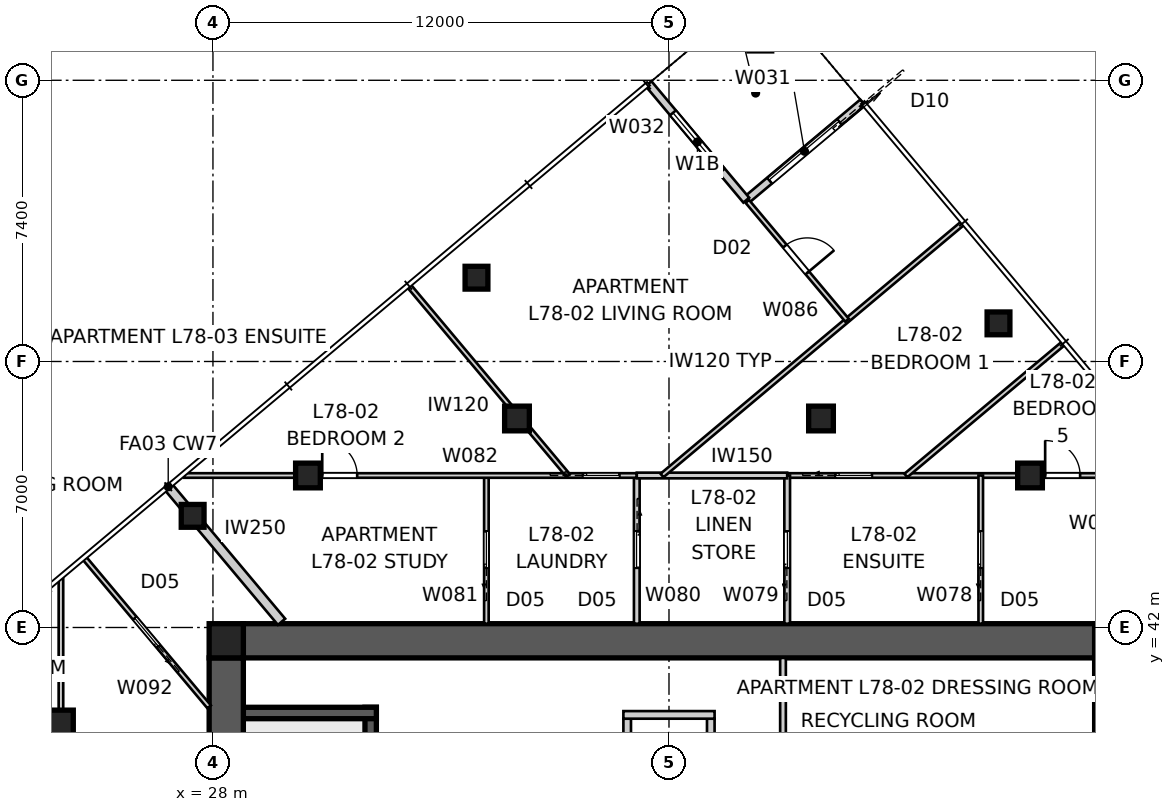
"""IFC4 building model, lengths in metres.
Left out: names, types, materials, properties, quantities, classifications, styles, units other than length and angle.
Written with IfcOpenShell. Run it as: python <this file> out.ifc"""

import sys

from ifc_helpers import new_model, si_unit, direction, frame, frame_2d, origin, origin_2d, place, context, subcontext, project, spatial, polyline, rectangle, outline, extrude, element, fill, save


model = new_model("IFC4")
c1 = context("Model", 3, precision=1e-05, world=origin(), true_north=direction((0.0, 1.0)))
c2 = subcontext(c1, "Body", "Model", "MODEL_VIEW")
j1 = project(units=[si_unit("LENGTHUNIT", "METRE"), si_unit("PLANEANGLEUNIT", "RADIAN")], contexts=[c1])
p1 = place(None, origin())
s1 = spatial("IfcSite", under=j1, at=p1, CompositionType="ELEMENT")
p2 = place(p1, origin())
s2 = spatial("IfcBuilding", under=s1, at=p2, CompositionType="ELEMENT")
p3 = place(p2, frame((0.0, 0.0, 282.8)))
s3 = spatial("IfcBuildingStorey", under=s2, at=p3, CompositionType="ELEMENT", Elevation=282.8)
p4 = place(p3, frame((28.8, 41.65, 0.0), z_axis=(0.0, 0.0, 1.0), x_axis=(1.0, 0.0, 0.0)))
e1 = element("IfcWall", 1, at=p4, inside=s3, PredefinedType="SHEAR", context=c2, shape_type="SweptSolid", body=[
    extrude(outline(polyline([(0.0, -0.45), (22.4, -0.45), (22.4, -0.025), (22.85, -0.025), (22.85, 0.025), (22.4, 0.025), (22.4, 0.45), (0.0, 0.45), (0.0, 0.025), (-0.45, 0.025), (-0.45, -0.025), (0.0, -0.025), (0.0, -0.45)])), origin(), (0.0, 0.0, 1.0), 3.4),
])
p5 = place(p3, frame((51.65, 18.8, 0.0), z_axis=(0.0, 0.0, 1.0), x_axis=(0.0, 1.0, 0.0)))
e2 = element("IfcWall", 2, at=p5, inside=s3, PredefinedType="SHEAR", context=c2, shape_type="SweptSolid", body=[
    extrude(outline(polyline([(0.0, -0.45), (22.4, -0.45), (22.4, -0.025), (22.85, -0.025), (22.85, 0.025), (22.4, 0.025), (22.4, 0.45), (0.0, 0.45), (0.0, 0.025), (-0.45, 0.025), (-0.45, -0.025), (0.0, -0.025), (0.0, -0.45)])), origin(), (0.0, 0.0, 1.0), 3.4),
])
p6 = place(p5, frame((11.14, 0.0, 0.0)))
e3 = element("IfcOpeningElement", 3, at=p6, cuts=e2, PredefinedType="OPENING", context=c2, shape_type="SweptSolid", body=[
    extrude(rectangle(XDim=1.02, YDim=2.4, at=frame_2d((0.51, 1.2))), frame((0.0, 0.46, 0.0), z_axis=(0.0, -1.0, 0.0), x_axis=(1.0, 0.0, 0.0)), (0.0, 0.0, 1.0), 0.92),
])
p7 = place(p3, frame((28.35, 41.2, 0.0), z_axis=(0.0, 0.0, 1.0), x_axis=(0.0, -1.0, 0.0)))
e4 = element("IfcWall", 4, at=p7, inside=s3, PredefinedType="SHEAR", context=c2, shape_type="SweptSolid", body=[
    extrude(outline(polyline([(0.0, -0.45), (22.4, -0.45), (22.4, -0.025), (22.85, -0.025), (22.85, 0.025), (22.4, 0.025), (22.4, 0.45), (0.0, 0.45), (0.0, 0.025), (-0.45, 0.025), (-0.45, -0.025), (0.0, -0.025), (0.0, -0.45)])), origin(), (0.0, 0.0, 1.0), 3.4),
])
p8 = place(p7, frame((11.14, 0.0, 0.0)))
e5 = element("IfcOpeningElement", 5, at=p8, cuts=e4, PredefinedType="OPENING", context=c2, shape_type="SweptSolid", body=[
    extrude(rectangle(XDim=1.02, YDim=2.4, at=frame_2d((0.51, 1.2))), frame((0.0, 0.46, 0.0), z_axis=(0.0, -1.0, 0.0), x_axis=(1.0, 0.0, 0.0)), (0.0, 0.0, 1.0), 0.92),
])
p9 = place(p3, frame((32.15, 32.2, 0.0), z_axis=(0.0, 0.0, 1.0), x_axis=(0.0, 1.0, 0.0)))
e6 = element("IfcWall", 6, at=p9, inside=s3, PredefinedType="SHEAR", context=c2, shape_type="SweptSolid", body=[
    extrude(rectangle(XDim=7.7, YDim=0.3, at=frame_2d((3.85, 0.0))), origin(), (0.0, 0.0, 1.0), 3.4),
])
p10 = place(p3, frame((28.8, 39.75, 0.0), z_axis=(0.0, 0.0, 1.0), x_axis=(1.0, 0.0, 0.0)))
e7 = element("IfcWall", 7, at=p10, inside=s3, PredefinedType="SHEAR", context=c2, shape_type="SweptSolid", body=[
    extrude(rectangle(XDim=3.5, YDim=0.3, at=frame_2d((1.75, 0.0))), origin(), (0.0, 0.0, 1.0), 3.4),
])
for number, where, z_axis, x_axis in (
    (8, (38.9, 37.6, 0.0), (0.0, 0.0, 1.0), (0.0, 1.0, 0.0)),
    (9, (41.1, 37.6, 0.0), (0.0, 0.0, 1.0), (0.0, 1.0, 0.0)),
):
    element("IfcWall", number, at=place(p3, frame(where, z_axis=z_axis, x_axis=x_axis)), inside=s3, PredefinedType="SOLIDWALL", context=c2, shape_type="SweptSolid", body=[
        extrude(rectangle(XDim=2.0, YDim=0.2, at=frame_2d((1.0, 0.0))), origin(), (0.0, 0.0, 1.0), 3.4),
    ])
p11 = place(p3, frame((38.8, 39.7, 0.0), z_axis=(0.0, 0.0, 1.0), x_axis=(1.0, 0.0, 0.0)))
e10 = element("IfcWall", 10, at=p11, inside=s3, PredefinedType="SOLIDWALL", context=c2, shape_type="SweptSolid", body=[
    extrude(rectangle(XDim=2.4, YDim=0.2, at=frame_2d((1.2, 0.0))), origin(), (0.0, 0.0, 1.0), 3.4),
])
for number, where, z_axis, x_axis in (
    (11, (51.65, 41.65, 0.0), (0.0, 0.0, 1.0), (1.0, 0.0, 0.0)),
    (12, (28.35, 41.65, 0.0), (0.0, 0.0, 1.0), (1.0, 0.0, 0.0)),
):
    element("IfcColumn", number, at=place(p3, frame(where, z_axis=z_axis, x_axis=x_axis)), inside=s3, PredefinedType="COLUMN", context=c2, shape_type="SweptSolid", body=[
        extrude(rectangle(XDim=0.9, YDim=0.9, at=origin_2d()), origin(), (0.0, 0.0, 1.0), 3.4),
    ])
for number, where, z_axis, x_axis in (
    (13, (48.671, 50.003, 0.0), (0.0, 0.0, 1.0), (1.0, 0.0, 0.0)),
    (14, (34.935, 51.205, 0.0), (0.0, 0.0, 1.0), (1.0, 0.0, 0.0)),
    (15, (27.466, 44.938, 0.0), (0.0, 0.0, 1.0), (1.0, 0.0, 0.0)),
):
    element("IfcColumn", number, at=place(p3, frame(where, z_axis=z_axis, x_axis=x_axis)), inside=s3, PredefinedType="COLUMN", context=c2, shape_type="SweptSolid", body=[
        extrude(rectangle(XDim=0.6, YDim=0.6, at=origin_2d()), origin(), (0.0, 0.0, 1.0), 3.4),
    ])
for number, where, z_axis, x_axis in (
    (16, (49.5, 46.0, 0.0), (0.0, 0.0, 1.0), (1.0, 0.0, 0.0)),
    (17, (44.0, 47.5, 0.0), (0.0, 0.0, 1.0), (1.0, 0.0, 0.0)),
    (18, (36.0, 47.5, 0.0), (0.0, 0.0, 1.0), (1.0, 0.0, 0.0)),
    (19, (30.5, 46.0, 0.0), (0.0, 0.0, 1.0), (1.0, 0.0, 0.0)),
    (20, (24.0, 39.5, 0.0), (0.0, 0.0, 1.0), (1.0, 0.0, 0.0)),
):
    element("IfcColumn", number, at=place(p3, frame(where, z_axis=z_axis, x_axis=x_axis)), inside=s3, PredefinedType="COLUMN", context=c2, shape_type="SweptSolid", body=[
        extrude(rectangle(XDim=0.65, YDim=0.65, at=origin_2d()), origin(), (0.0, 0.0, 1.0), 3.4),
    ])
p12 = place(p3, frame((45.098, 55.817, 0.0), z_axis=(0.0, 0.0, 1.0), x_axis=(-0.766060656284, -0.642768287094, 0.0)))
e21 = element("IfcWall", 21, at=p12, inside=s3, PredefinedType="SOLIDWALL", context=c2, shape_type="SweptSolid", body=[
    extrude(rectangle(XDim=4.0, YDim=0.2, at=frame_2d((2.0, 0.0))), origin(), (0.0, 0.0, 1.0), 3.25),
])
p13 = place(p12, frame((0.8, 0.0, 0.0)))
e22 = element("IfcOpeningElement", 22, at=p13, cuts=e21, PredefinedType="OPENING", context=c2, shape_type="SweptSolid", body=[
    extrude(rectangle(XDim=2.4, YDim=2.4, at=frame_2d((1.2, 1.2))), frame((0.0, 0.11, 0.0), z_axis=(0.0, -1.0, 0.0), x_axis=(1.0, 0.0, 0.0)), (0.0, 0.0, 1.0), 0.22),
])
p14 = place(p3, frame((42.034, 53.246, 0.0), z_axis=(0.0, 0.0, 1.0), x_axis=(-0.642798342015, 0.766035437498, 0.0)))
e23 = element("IfcWall", 23, at=p14, inside=s3, PredefinedType="SOLIDWALL", context=c2, shape_type="SweptSolid", body=[
    extrude(rectangle(XDim=4.0, YDim=0.2, at=frame_2d((2.0, 0.0))), origin(), (0.0, 0.0, 1.0), 3.25),
])
p15 = place(p14, frame((1.0, 0.0, 0.45)))
e24 = element("IfcOpeningElement", 24, at=p15, cuts=e23, PredefinedType="OPENING", context=c2, shape_type="SweptSolid", body=[
    extrude(rectangle(XDim=2.0, YDim=1.8, at=frame_2d((1.0, 0.9))), frame((0.0, 0.11, 0.0), z_axis=(0.0, -1.0, 0.0), x_axis=(1.0, 0.0, 0.0)), (0.0, 0.0, 1.0), 0.22),
])
p16 = place(p3, frame((26.823, 45.704, 0.0), z_axis=(0.0, 0.0, 1.0), x_axis=(0.64279957712, -0.76603440109, 0.0)))
e25 = element("IfcWall", 25, at=p16, inside=s3, PredefinedType="PARTITIONING", context=c2, shape_type="SweptSolid", body=[
    extrude(rectangle(XDim=4.64, YDim=0.25, at=frame_2d((2.32, 0.0))), origin(), (0.0, 0.0, 1.0), 3.25),
])
p17 = place(p3, frame((43.0, 41.2, 0.0), z_axis=(0.0, 0.0, 1.0), x_axis=(0.0, -1.0, 0.0)))
e26 = element("IfcWall", 26, at=p17, inside=s3, PredefinedType="SOLIDWALL", context=c2, shape_type="SweptSolid", body=[
    extrude(rectangle(XDim=5.9, YDim=0.15, at=frame_2d((2.95, 0.0))), origin(), (0.0, 0.0, 1.0), 3.25),
])
p18 = place(p3, frame((43.11, 46.0, 0.0), z_axis=(0.0, 0.0, 1.0), x_axis=(1.0, 0.0, 0.0)))
e27 = element("IfcWall", 27, at=p18, inside=s3, PredefinedType="PARTITIONING", context=c2, shape_type="SweptSolid", body=[
    extrude(rectangle(XDim=10.173, YDim=0.12, at=frame_2d((5.086, 0.0))), origin(), (0.0, 0.0, 1.0), 2.549),
])
p19 = place(p18, frame((6.788, 0.0, 0.0)))
e28 = element("IfcOpeningElement", 28, at=p19, cuts=e27, PredefinedType="OPENING", context=c2, shape_type="SweptSolid", body=[
    extrude(rectangle(XDim=0.92, YDim=2.34, at=frame_2d((0.46, 1.17))), frame((0.0, 0.07, 0.0), z_axis=(0.0, -1.0, 0.0), x_axis=(1.0, 0.0, 0.0)), (0.0, 0.0, 1.0), 0.14),
])
p20 = place(p18, frame((1.271, 0.0, 0.0)))
e29 = element("IfcOpeningElement", 29, at=p20, cuts=e27, PredefinedType="OPENING", context=c2, shape_type="SweptSolid", body=[
    extrude(rectangle(XDim=0.96, YDim=2.1, at=frame_2d((0.48, 1.05))), frame((0.0, 0.07, 0.0), z_axis=(0.0, -1.0, 0.0), x_axis=(1.0, 0.0, 0.0)), (0.0, 0.0, 1.0), 0.14),
])
p21 = place(p3, frame((48.203, 42.1, 0.0), z_axis=(0.0, 0.0, 1.0), x_axis=(0.0, 1.0, 0.0)))
e30 = element("IfcWall", 30, at=p21, inside=s3, PredefinedType="PARTITIONING", context=c2, shape_type="SweptSolid", body=[
    extrude(rectangle(XDim=3.9, YDim=0.12, at=frame_2d((1.95, 0.0))), origin(), (0.0, 0.0, 1.0), 3.25),
])
p22 = place(p21, frame((1.47, 0.0, 0.0)))
e31 = element("IfcOpeningElement", 31, at=p22, cuts=e30, PredefinedType="OPENING", context=c2, shape_type="SweptSolid", body=[
    extrude(rectangle(XDim=0.96, YDim=2.1, at=frame_2d((0.48, 1.05))), frame((0.0, 0.07, 0.0), z_axis=(0.0, -1.0, 0.0), x_axis=(1.0, 0.0, 0.0)), (0.0, 0.0, 1.0), 0.14),
])
p23 = place(p3, frame((43.11, 42.1, 0.0), z_axis=(0.0, 0.0, 1.0), x_axis=(0.0, 1.0, 0.0)))
e32 = element("IfcWall", 32, at=p23, inside=s3, PredefinedType="SOLIDWALL", context=c2, shape_type="SweptSolid", body=[
    extrude(rectangle(XDim=3.9, YDim=0.15, at=frame_2d((1.95, 0.0))), origin(), (0.0, 0.0, 1.0), 3.25),
])
p24 = place(p23, frame((1.47, 0.0, 0.0)))
e33 = element("IfcOpeningElement", 33, at=p24, cuts=e32, PredefinedType="OPENING", context=c2, shape_type="SweptSolid", body=[
    extrude(rectangle(XDim=0.96, YDim=2.1, at=frame_2d((0.48, 1.05))), frame((0.0, 0.085, 0.0), z_axis=(0.0, -1.0, 0.0), x_axis=(1.0, 0.0, 0.0)), (0.0, 0.0, 1.0), 0.17),
])
p25 = place(p3, frame((39.153, 46.0, 0.0), z_axis=(0.0, 0.0, 1.0), x_axis=(0.0, -1.0, 0.0)))
e34 = element("IfcWall", 34, at=p25, inside=s3, PredefinedType="SOLIDWALL", context=c2, shape_type="SweptSolid", body=[
    extrude(rectangle(XDim=3.9, YDim=0.15, at=frame_2d((1.95, 0.0))), origin(), (0.0, 0.0, 1.0), 3.25),
])
p26 = place(p25, frame((1.47, 0.0, 0.0)))
e35 = element("IfcOpeningElement", 35, at=p26, cuts=e34, PredefinedType="OPENING", context=c2, shape_type="SweptSolid", body=[
    extrude(rectangle(XDim=0.96, YDim=2.1, at=frame_2d((0.48, 1.05))), frame((0.0, 0.085, 0.0), z_axis=(0.0, -1.0, 0.0), x_axis=(1.0, 0.0, 0.0)), (0.0, 0.0, 1.0), 0.17),
])
p27 = place(p3, frame((35.195, 42.1, 0.0), z_axis=(0.0, 0.0, 1.0), x_axis=(0.0, 1.0, 0.0)))
e36 = element("IfcWall", 36, at=p27, inside=s3, PredefinedType="PARTITIONING", context=c2, shape_type="SweptSolid", body=[
    extrude(rectangle(XDim=3.9, YDim=0.12, at=frame_2d((1.95, 0.0))), origin(), (0.0, 0.0, 1.0), 3.25),
])
p28 = place(p27, frame((1.47, 0.0, 0.0)))
e37 = element("IfcOpeningElement", 37, at=p28, cuts=e36, PredefinedType="OPENING", context=c2, shape_type="SweptSolid", body=[
    extrude(rectangle(XDim=0.96, YDim=2.1, at=frame_2d((0.48, 1.05))), frame((0.0, 0.07, 0.0), z_axis=(0.0, -1.0, 0.0), x_axis=(1.0, 0.0, 0.0)), (0.0, 0.0, 1.0), 0.14),
])
p29 = place(p3, frame((27.238, 46.0, 0.0), z_axis=(0.0, 0.0, 1.0), x_axis=(1.0, 0.0, 0.0)))
e38 = element("IfcWall", 38, at=p29, inside=s3, PredefinedType="PARTITIONING", context=c2, shape_type="SweptSolid", body=[
    extrude(rectangle(XDim=11.915, YDim=0.12, at=frame_2d((5.957, 0.0))), origin(), (0.0, 0.0, 1.0), 2.549),
])
p30 = place(p29, frame((3.637, 0.0, 0.0)))
e39 = element("IfcOpeningElement", 39, at=p30, cuts=e38, PredefinedType="OPENING", context=c2, shape_type="SweptSolid", body=[
    extrude(rectangle(XDim=0.92, YDim=2.34, at=frame_2d((0.46, 1.17))), frame((0.0, 0.07, 0.0), z_axis=(0.0, -1.0, 0.0), x_axis=(1.0, 0.0, 0.0)), (0.0, 0.0, 1.0), 0.14),
])
p31 = place(p29, frame((10.498, 0.0, 0.0)))
e40 = element("IfcOpeningElement", 40, at=p31, cuts=e38, PredefinedType="OPENING", context=c2, shape_type="SweptSolid", body=[
    extrude(rectangle(XDim=0.96, YDim=2.1, at=frame_2d((0.48, 1.05))), frame((0.0, 0.07, 0.0), z_axis=(0.0, -1.0, 0.0), x_axis=(1.0, 0.0, 0.0)), (0.0, 0.0, 1.0), 0.14),
])
p32 = place(p3, frame((39.153, 46.0, 0.0), z_axis=(0.0, 0.0, 1.0), x_axis=(1.0, 0.0, 0.0)))
e41 = element("IfcWall", 41, at=p32, inside=s3, PredefinedType="SOLIDWALL", context=c2, shape_type="SweptSolid", body=[
    extrude(rectangle(XDim=3.958, YDim=0.15, at=frame_2d((1.979, 0.0))), origin(), (0.0, 0.0, 1.0), 3.25),
])
p33 = place(p3, frame((47.719, 52.631, 0.0), z_axis=(0.0, 0.0, 1.0), x_axis=(-0.766052076481, -0.64277851249, 0.0)))
e42 = element("IfcWall", 42, at=p33, inside=s3, PredefinedType="PARTITIONING", context=c2, shape_type="SweptSolid", body=[
    extrude(rectangle(XDim=10.316, YDim=0.12, at=frame_2d((5.158, 0.0))), origin(), (0.0, 0.0, 1.0), 3.25),
])
p34 = place(p3, frame((37.344, 46.0, 0.0), z_axis=(0.0, 0.0, 1.0), x_axis=(-0.642779498388, 0.766051249233, 0.0)))
e43 = element("IfcWall", 43, at=p34, inside=s3, PredefinedType="PARTITIONING", context=c2, shape_type="SweptSolid", body=[
    extrude(rectangle(XDim=6.496, YDim=0.12, at=frame_2d((3.248, 0.0))), origin(), (0.0, 0.0, 1.0), 3.25),
])
p35 = place(p3, frame((42.06, 53.215, 0.0), z_axis=(0.0, 0.0, 1.0), x_axis=(0.642796729538, -0.766036790562, 0.0)))
e44 = element("IfcWall", 44, at=p35, inside=s3, PredefinedType="PARTITIONING", context=c2, shape_type="SweptSolid", body=[
    extrude(rectangle(XDim=4.085, YDim=0.12, at=frame_2d((2.042, 0.0))), origin(), (0.0, 0.0, 1.0), 3.25),
])
p36 = place(p35, frame((1.538, 0.0, 0.0)))
e45 = element("IfcOpeningElement", 45, at=p36, cuts=e44, PredefinedType="OPENING", context=c2, shape_type="SweptSolid", body=[
    extrude(rectangle(XDim=0.92, YDim=2.34, at=frame_2d((0.46, 1.17))), frame((0.0, 0.07, 0.0), z_axis=(0.0, -1.0, 0.0), x_axis=(1.0, 0.0, 0.0)), (0.0, 0.0, 1.0), 0.14),
])
p37 = place(p3, frame((50.37, 49.471, 0.0), z_axis=(0.0, 0.0, 1.0), x_axis=(-0.766056536168, -0.642773197476, 0.0)))
e46 = element("IfcWall", 46, at=p37, inside=s3, PredefinedType="PARTITIONING", context=c2, shape_type="SweptSolid", body=[
    extrude(rectangle(XDim=5.4, YDim=0.12, at=frame_2d((2.7, 0.0))), origin(), (0.0, 0.0, 1.0), 3.25),
])
p38 = place(p3, frame((24.0, 17.238, 0.0), z_axis=(0.0, 0.0, 1.0), x_axis=(0.0, 1.0, 0.0)))
e47 = element("IfcWall", 47, at=p38, inside=s3, PredefinedType="PARTITIONING", context=c2, shape_type="SweptSolid", body=[
    extrude(rectangle(XDim=26.045, YDim=0.12, at=frame_2d((13.022, 0.0))), origin(), (0.0, 0.0, 1.0), 2.549),
])
p39 = place(p38, frame((13.116, 0.0, 0.0)))
e48 = element("IfcOpeningElement", 48, at=p39, cuts=e47, PredefinedType="OPENING", context=c2, shape_type="SweptSolid", body=[
    extrude(rectangle(XDim=0.92, YDim=2.34, at=frame_2d((0.46, 1.17))), frame((0.0, 0.07, 0.0), z_axis=(0.0, -1.0, 0.0), x_axis=(1.0, 0.0, 0.0)), (0.0, 0.0, 1.0), 0.14),
])
p40 = place(p38, frame((15.705, 0.0, 0.0)))
e49 = element("IfcOpeningElement", 49, at=p40, cuts=e47, PredefinedType="OPENING", context=c2, shape_type="SweptSolid", body=[
    extrude(rectangle(XDim=0.92, YDim=2.34, at=frame_2d((0.46, 1.17))), frame((0.0, 0.07, 0.0), z_axis=(0.0, -1.0, 0.0), x_axis=(1.0, 0.0, 0.0)), (0.0, 0.0, 1.0), 0.14),
])
p41 = place(p38, frame((20.191, 0.0, 0.0)))
e50 = element("IfcOpeningElement", 50, at=p41, cuts=e47, PredefinedType="OPENING", context=c2, shape_type="SweptSolid", body=[
    extrude(rectangle(XDim=0.96, YDim=2.1, at=frame_2d((0.48, 1.05))), frame((0.0, 0.07, 0.0), z_axis=(0.0, -1.0, 0.0), x_axis=(1.0, 0.0, 0.0)), (0.0, 0.0, 1.0), 0.14),
])
p42 = place(p38, frame((3.631, 0.0, 0.0)))
e51 = element("IfcOpeningElement", 51, at=p42, cuts=e47, PredefinedType="OPENING", context=c2, shape_type="SweptSolid", body=[
    extrude(rectangle(XDim=0.92, YDim=2.34, at=frame_2d((0.46, 1.17))), frame((0.0, 0.07, 0.0), z_axis=(0.0, -1.0, 0.0), x_axis=(1.0, 0.0, 0.0)), (0.0, 0.0, 1.0), 0.14),
])
p43 = place(p3, frame((27.9, 39.913, 0.0), z_axis=(0.0, 0.0, 1.0), x_axis=(-0.64279031777, 0.766042170759, 0.0)))
e52 = element("IfcWall", 52, at=p43, inside=s3, PredefinedType="PARTITIONING", context=c2, shape_type="SweptSolid", body=[
    extrude(rectangle(XDim=5.089, YDim=0.12, at=frame_2d((2.544, 0.0))), origin(), (0.0, 0.0, 1.0), 3.25),
])
p44 = place(p43, frame((2.084, 0.0, 0.0)))
e53 = element("IfcOpeningElement", 53, at=p44, cuts=e52, PredefinedType="OPENING", context=c2, shape_type="SweptSolid", body=[
    extrude(rectangle(XDim=0.96, YDim=2.1, at=frame_2d((0.48, 1.05))), frame((0.0, 0.07, 0.0), z_axis=(0.0, -1.0, 0.0), x_axis=(1.0, 0.0, 0.0)), (0.0, 0.0, 1.0), 0.14),
])
p45 = place(p3, frame((20.529, 40.37, 0.0), z_axis=(0.0, 0.0, 1.0), x_axis=(0.642799726543, -0.766034275706, 0.0)))
e54 = element("IfcWall", 54, at=p45, inside=s3, PredefinedType="PARTITIONING", context=c2, shape_type="SweptSolid", body=[
    extrude(rectangle(XDim=5.4, YDim=0.12, at=frame_2d((2.7, 0.0))), origin(), (0.0, 0.0, 1.0), 3.25),
])
p46 = place(p13, origin())
e55 = element("IfcDoor", 55, at=p46, inside=s3, OperationType="SLIDING_TO_LEFT", PredefinedType="DOOR", context=c2, shape_type="SweptSolid", body=[
    extrude(rectangle(XDim=2.4, YDim=2.4, at=frame_2d((1.2, 1.2))), frame((0.0, 0.025, 0.0), z_axis=(0.0, -1.0, 0.0), x_axis=(1.0, 0.0, 0.0)), (0.0, 0.0, 1.0), 0.05),
])
fill(e22, e55)
p47 = place(p15, origin())
e56 = element("IfcWindow", 56, at=p47, inside=s3, PartitioningType="SINGLE_PANEL", PredefinedType="WINDOW", context=c2, shape_type="SweptSolid", body=[
    extrude(rectangle(XDim=2.0, YDim=1.8, at=frame_2d((1.0, 0.9))), frame((0.0, 0.03, 0.0), z_axis=(0.0, -1.0, 0.0), x_axis=(1.0, 0.0, 0.0)), (0.0, 0.0, 1.0), 0.06),
])
fill(e24, e56)
p48 = place(p19, origin())
e57 = element("IfcDoor", 57, at=p48, inside=s3, OperationType="SINGLE_SWING_LEFT", PredefinedType="DOOR", context=c2, shape_type="SweptSolid", body=[
    extrude(rectangle(XDim=0.92, YDim=2.34, at=frame_2d((0.46, 1.17))), frame((0.0, 0.025, 0.0), z_axis=(0.0, -1.0, 0.0), x_axis=(1.0, 0.0, 0.0)), (0.0, 0.0, 1.0), 0.05),
])
fill(e28, e57)
p49 = place(p22, origin())
e58 = element("IfcDoor", 58, at=p49, inside=s3, OperationType="SLIDING_TO_LEFT", PredefinedType="DOOR", context=c2, shape_type="SweptSolid", body=[
    extrude(rectangle(XDim=0.96, YDim=2.1, at=frame_2d((0.48, 1.05))), frame((0.0, 0.025, 0.0), z_axis=(0.0, -1.0, 0.0), x_axis=(1.0, 0.0, 0.0)), (0.0, 0.0, 1.0), 0.05),
])
fill(e31, e58)
p50 = place(p44, origin())
e59 = element("IfcDoor", 59, at=p50, inside=s3, OperationType="SLIDING_TO_LEFT", PredefinedType="DOOR", context=c2, shape_type="SweptSolid", body=[
    extrude(rectangle(XDim=0.96, YDim=2.1, at=frame_2d((0.48, 1.05))), frame((0.0, 0.025, 0.0), z_axis=(0.0, -1.0, 0.0), x_axis=(1.0, 0.0, 0.0)), (0.0, 0.0, 1.0), 0.05),
])
fill(e53, e59)
p51 = place(p24, origin())
e60 = element("IfcDoor", 60, at=p51, inside=s3, OperationType="SLIDING_TO_LEFT", PredefinedType="DOOR", context=c2, shape_type="SweptSolid", body=[
    extrude(rectangle(XDim=0.96, YDim=2.1, at=frame_2d((0.48, 1.05))), frame((0.0, 0.025, 0.0), z_axis=(0.0, -1.0, 0.0), x_axis=(1.0, 0.0, 0.0)), (0.0, 0.0, 1.0), 0.05),
])
fill(e33, e60)
p52 = place(p20, origin())
e61 = element("IfcDoor", 61, at=p52, inside=s3, OperationType="SLIDING_TO_LEFT", PredefinedType="DOOR", context=c2, shape_type="SweptSolid", body=[
    extrude(rectangle(XDim=0.96, YDim=2.1, at=frame_2d((0.48, 1.05))), frame((0.0, 0.025, 0.0), z_axis=(0.0, -1.0, 0.0), x_axis=(1.0, 0.0, 0.0)), (0.0, 0.0, 1.0), 0.05),
])
fill(e29, e61)
p53 = place(p26, origin())
e62 = element("IfcDoor", 62, at=p53, inside=s3, OperationType="SLIDING_TO_LEFT", PredefinedType="DOOR", context=c2, shape_type="SweptSolid", body=[
    extrude(rectangle(XDim=0.96, YDim=2.1, at=frame_2d((0.48, 1.05))), frame((0.0, 0.025, 0.0), z_axis=(0.0, -1.0, 0.0), x_axis=(1.0, 0.0, 0.0)), (0.0, 0.0, 1.0), 0.05),
])
fill(e35, e62)
p54 = place(p28, origin())
e63 = element("IfcDoor", 63, at=p54, inside=s3, OperationType="SLIDING_TO_LEFT", PredefinedType="DOOR", context=c2, shape_type="SweptSolid", body=[
    extrude(rectangle(XDim=0.96, YDim=2.1, at=frame_2d((0.48, 1.05))), frame((0.0, 0.025, 0.0), z_axis=(0.0, -1.0, 0.0), x_axis=(1.0, 0.0, 0.0)), (0.0, 0.0, 1.0), 0.05),
])
fill(e37, e63)
p55 = place(p30, origin())
e64 = element("IfcDoor", 64, at=p55, inside=s3, OperationType="SINGLE_SWING_LEFT", PredefinedType="DOOR", context=c2, shape_type="SweptSolid", body=[
    extrude(rectangle(XDim=0.92, YDim=2.34, at=frame_2d((0.46, 1.17))), frame((0.0, 0.025, 0.0), z_axis=(0.0, -1.0, 0.0), x_axis=(1.0, 0.0, 0.0)), (0.0, 0.0, 1.0), 0.05),
])
fill(e39, e64)
p56 = place(p31, origin())
e65 = element("IfcDoor", 65, at=p56, inside=s3, OperationType="SLIDING_TO_LEFT", PredefinedType="DOOR", context=c2, shape_type="SweptSolid", body=[
    extrude(rectangle(XDim=0.96, YDim=2.1, at=frame_2d((0.48, 1.05))), frame((0.0, 0.025, 0.0), z_axis=(0.0, -1.0, 0.0), x_axis=(1.0, 0.0, 0.0)), (0.0, 0.0, 1.0), 0.05),
])
fill(e40, e65)
p57 = place(p36, origin())
e66 = element("IfcDoor", 66, at=p57, inside=s3, OperationType="SINGLE_SWING_RIGHT", PredefinedType="DOOR", context=c2, shape_type="SweptSolid", body=[
    extrude(rectangle(XDim=0.92, YDim=2.34, at=frame_2d((0.46, 1.17))), frame((0.0, 0.025, 0.0), z_axis=(0.0, -1.0, 0.0), x_axis=(1.0, 0.0, 0.0)), (0.0, 0.0, 1.0), 0.05),
])
fill(e45, e66)
save(model, sys.argv[1])
